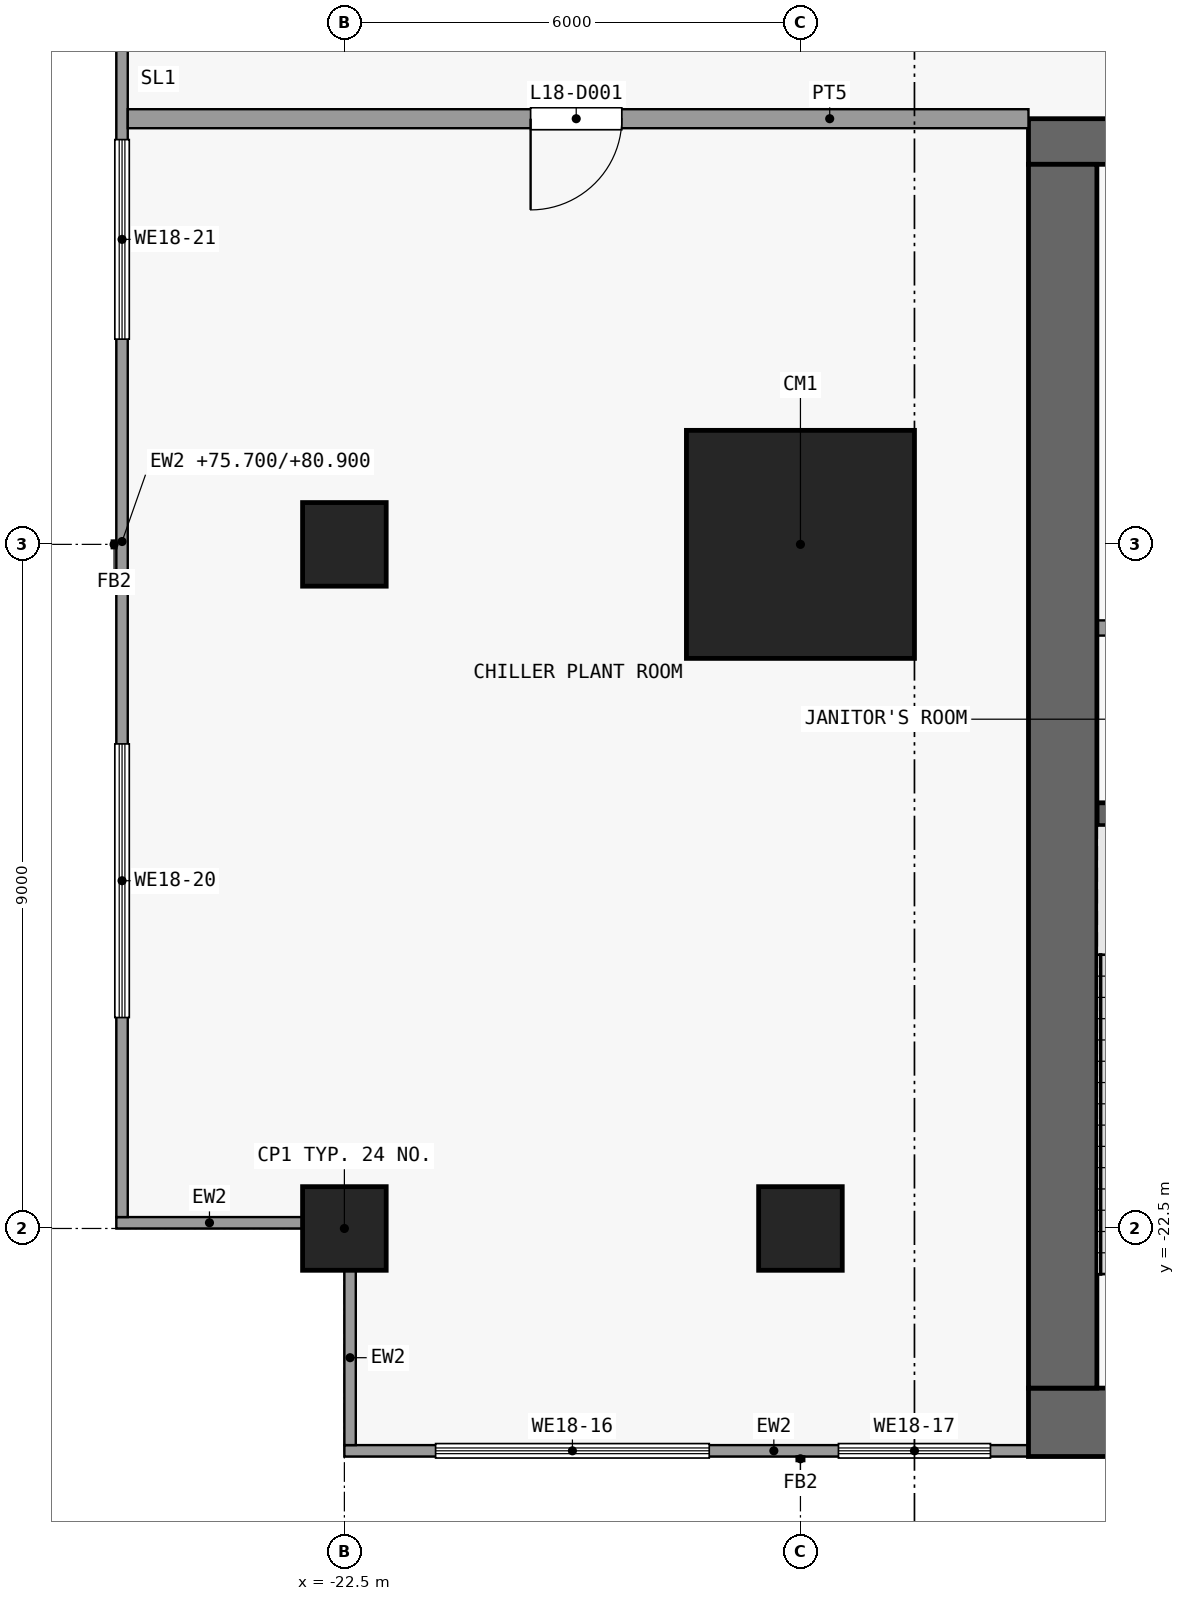
"""IFC4 building model, lengths in metres.
Left out: names, types, materials, properties, quantities, classifications, styles, units other than length and angle.
Written with IfcOpenShell. Run it as: python <this file> out.ifc"""

import sys

from ifc_helpers import new_model, si_unit, direction, frame, frame_2d, origin, origin_2d, place, context, subcontext, project, spatial, rectangle, extrude, element, fill, save


model = new_model("IFC4")
c1 = context("Model", 3, precision=1e-05, world=origin(), true_north=direction((0.0, 1.0)))
c2 = subcontext(c1, "Body", "Model", "MODEL_VIEW")
j1 = project(units=[si_unit("LENGTHUNIT", "METRE"), si_unit("PLANEANGLEUNIT", "RADIAN")], contexts=[c1])
p1 = place(None, origin())
s1 = spatial("IfcSite", under=j1, at=p1, CompositionType="ELEMENT")
p2 = place(p1, origin())
s2 = spatial("IfcBuilding", under=s1, at=p2, CompositionType="ELEMENT")
p3 = place(p2, frame((0.0, 0.0, 75.7)))
s3 = spatial("IfcBuildingStorey", under=s2, at=p3, CompositionType="ELEMENT", Elevation=75.7)
for number, where, z_axis, x_axis in (
    (1, (-22.5, -22.5, 0.0), (0.0, 0.0, 1.0), (1.0, 0.0, 0.0)),
    (2, (-22.5, -13.5, 0.0), (0.0, 0.0, 1.0), (1.0, 0.0, 0.0)),
    (3, (-16.5, -22.5, 0.0), (0.0, 0.0, 1.0), (1.0, 0.0, 0.0)),
):
    element("IfcColumn", number, at=place(p3, frame(where, z_axis=z_axis, x_axis=x_axis)), inside=s3, PredefinedType="COLUMN", context=c2, shape_type="SweptSolid", body=[
        extrude(rectangle(XDim=1.1, YDim=1.1, at=origin_2d()), origin(), (0.0, 0.0, 1.0), 5.4),
    ])
p4 = place(p3, frame((-16.5, -13.5, 0.0), z_axis=(0.0, 0.0, 1.0), x_axis=(1.0, 0.0, 0.0)))
e4 = element("IfcColumn", 4, at=p4, inside=s3, PredefinedType="COLUMN", context=c2, shape_type="SweptSolid", body=[
    extrude(rectangle(XDim=3.0, YDim=3.0, at=origin_2d()), origin(), (0.0, 0.0, 1.0), 5.4),
])
p5 = place(p3, frame((-13.5, -25.05, 0.0), z_axis=(0.0, 0.0, 1.0), x_axis=(1.0, 0.0, 0.0)))
e5 = element("IfcWall", 5, at=p5, inside=s3, PredefinedType="SHEAR", context=c2, shape_type="SweptSolid", body=[
    extrude(rectangle(XDim=27.0, YDim=0.9, at=frame_2d((13.5, 0.0))), origin(), (0.0, 0.0, 1.0), 5.0),
])
p6 = place(p3, frame((-13.5, -8.2, 0.0), z_axis=(0.0, 0.0, 1.0), x_axis=(1.0, 0.0, 0.0)))
e6 = element("IfcWall", 6, at=p6, inside=s3, PredefinedType="SHEAR", context=c2, shape_type="SweptSolid", body=[
    extrude(rectangle(XDim=27.0, YDim=0.6, at=frame_2d((13.5, 0.0))), origin(), (0.0, 0.0, 1.0), 5.0),
])
p7 = place(p6, frame((7.8, 0.0, 0.0)))
e7 = element("IfcOpeningElement", 7, at=p7, cuts=e6, PredefinedType="OPENING", context=c2, shape_type="SweptSolid", body=[
    extrude(rectangle(XDim=1.8, YDim=2.1, at=frame_2d((0.9, 1.05))), frame((0.0, 0.31, 0.0), z_axis=(0.0, -1.0, 0.0), x_axis=(1.0, 0.0, 0.0)), (0.0, 0.0, 1.0), 0.62),
])
p8 = place(p6, frame((17.4, 0.0, 0.0)))
e8 = element("IfcOpeningElement", 8, at=p8, cuts=e6, PredefinedType="OPENING", context=c2, shape_type="SweptSolid", body=[
    extrude(rectangle(XDim=1.8, YDim=2.1, at=frame_2d((0.9, 1.05))), frame((0.0, 0.31, 0.0), z_axis=(0.0, -1.0, 0.0), x_axis=(1.0, 0.0, 0.0)), (0.0, 0.0, 1.0), 0.62),
])
p9 = place(p6, frame((2.725, 0.0, 0.0)))
e9 = element("IfcOpeningElement", 9, at=p9, cuts=e6, PredefinedType="OPENING", context=c2, shape_type="SweptSolid", body=[
    extrude(rectangle(XDim=0.9, YDim=2.1, at=frame_2d((0.45, 1.05))), frame((0.0, 0.31, 0.0), z_axis=(0.0, -1.0, 0.0), x_axis=(1.0, 0.0, 0.0)), (0.0, 0.0, 1.0), 0.62),
])
p10 = place(p6, frame((23.375, 0.0, 0.0)))
e10 = element("IfcOpeningElement", 10, at=p10, cuts=e6, PredefinedType="OPENING", context=c2, shape_type="SweptSolid", body=[
    extrude(rectangle(XDim=0.9, YDim=2.1, at=frame_2d((0.45, 1.05))), frame((0.0, 0.31, 0.0), z_axis=(0.0, -1.0, 0.0), x_axis=(1.0, 0.0, 0.0)), (0.0, 0.0, 1.0), 0.62),
])
p11 = place(p3, frame((-13.05, -24.6, 0.0), z_axis=(0.0, 0.0, 1.0), x_axis=(0.0, 1.0, 0.0)))
e11 = element("IfcWall", 11, at=p11, inside=s3, PredefinedType="SHEAR", context=c2, shape_type="SweptSolid", body=[
    extrude(rectangle(XDim=16.1, YDim=0.9, at=frame_2d((8.05, 0.0))), origin(), (0.0, 0.0, 1.0), 5.0),
])
p12 = place(p3, frame((-12.6, -17.05, 0.0), z_axis=(0.0, 0.0, 1.0), x_axis=(1.0, 0.0, 0.0)))
e12 = element("IfcWall", 12, at=p12, inside=s3, PredefinedType="SHEAR", context=c2, shape_type="SweptSolid", body=[
    extrude(rectangle(XDim=2.85, YDim=0.3, at=frame_2d((1.425, 0.0))), origin(), (0.0, 0.0, 1.0), 5.0),
])
p13 = place(p3, frame((-12.6, -14.6, 0.0), z_axis=(0.0, 0.0, 1.0), x_axis=(1.0, 0.0, 0.0)))
e13 = element("IfcWall", 13, at=p13, inside=s3, PredefinedType="PARTITIONING", context=c2, shape_type="SweptSolid", body=[
    extrude(rectangle(XDim=1.45, YDim=0.2, at=frame_2d((0.725, 0.0))), origin(), (0.0, 0.0, 1.0), 5.0),
])
p14 = place(p3, frame((-13.5, -25.425, 0.0), z_axis=(0.0, 0.0, 1.0), x_axis=(-1.0, 0.0, 0.0)))
e14 = element("IfcWall", 14, at=p14, inside=s3, PredefinedType="SOLIDWALL", context=c2, shape_type="SweptSolid", body=[
    extrude(rectangle(XDim=9.0, YDim=0.15, at=frame_2d((4.5, 0.0))), origin(), (0.0, 0.0, 1.0), 5.0),
])
p15 = place(p14, frame((4.2, 0.0, 1.2)))
e15 = element("IfcOpeningElement", 15, at=p15, cuts=e14, PredefinedType="OPENING", context=c2, shape_type="SweptSolid", body=[
    extrude(rectangle(XDim=3.6, YDim=3.0, at=frame_2d((1.8, 1.5))), frame((0.0, 0.085, 0.0), z_axis=(0.0, -1.0, 0.0), x_axis=(1.0, 0.0, 0.0)), (0.0, 0.0, 1.0), 0.17),
])
p16 = place(p14, frame((0.5, 0.0, 1.2)))
e16 = element("IfcOpeningElement", 16, at=p16, cuts=e14, PredefinedType="OPENING", context=c2, shape_type="SweptSolid", body=[
    extrude(rectangle(XDim=2.0, YDim=3.0, at=frame_2d((1.0, 1.5))), frame((0.0, 0.085, 0.0), z_axis=(0.0, -1.0, 0.0), x_axis=(1.0, 0.0, 0.0)), (0.0, 0.0, 1.0), 0.17),
])
p17 = place(p3, frame((-25.425, -22.35, 0.0), z_axis=(0.0, 0.0, 1.0), x_axis=(0.0, 1.0, 0.0)))
e17 = element("IfcWall", 17, at=p17, inside=s3, PredefinedType="SOLIDWALL", context=c2, shape_type="SweptSolid", body=[
    extrude(rectangle(XDim=47.7, YDim=0.15, at=frame_2d((23.85, 0.0))), origin(), (0.0, 0.0, 1.0), 5.2),
])
p18 = place(p17, frame((2.625, 0.0, 1.2)))
e18 = element("IfcOpeningElement", 18, at=p18, cuts=e17, PredefinedType="OPENING", context=c2, shape_type="SweptSolid", body=[
    extrude(rectangle(XDim=3.6, YDim=3.0, at=frame_2d((1.8, 1.5))), frame((0.0, 0.085, 0.0), z_axis=(0.0, -1.0, 0.0), x_axis=(1.0, 0.0, 0.0)), (0.0, 0.0, 1.0), 0.17),
])
p19 = place(p17, frame((11.55, 0.0, 1.2)))
e19 = element("IfcOpeningElement", 19, at=p19, cuts=e17, PredefinedType="OPENING", context=c2, shape_type="SweptSolid", body=[
    extrude(rectangle(XDim=2.625, YDim=3.0, at=frame_2d((1.312, 1.5))), frame((0.0, 0.085, 0.0), z_axis=(0.0, -1.0, 0.0), x_axis=(1.0, 0.0, 0.0)), (0.0, 0.0, 1.0), 0.17),
])
p20 = place(p17, frame((19.05, 0.0, 1.2)))
e20 = element("IfcOpeningElement", 20, at=p20, cuts=e17, PredefinedType="OPENING", context=c2, shape_type="SweptSolid", body=[
    extrude(rectangle(XDim=3.6, YDim=3.0, at=frame_2d((1.8, 1.5))), frame((0.0, 0.085, 0.0), z_axis=(0.0, -1.0, 0.0), x_axis=(1.0, 0.0, 0.0)), (0.0, 0.0, 1.0), 0.17),
])
p21 = place(p17, frame((25.05, 0.0, 1.2)))
e21 = element("IfcOpeningElement", 21, at=p21, cuts=e17, PredefinedType="OPENING", context=c2, shape_type="SweptSolid", body=[
    extrude(rectangle(XDim=3.6, YDim=3.0, at=frame_2d((1.8, 1.5))), frame((0.0, 0.085, 0.0), z_axis=(0.0, -1.0, 0.0), x_axis=(1.0, 0.0, 0.0)), (0.0, 0.0, 1.0), 0.17),
])
p22 = place(p17, frame((31.05, 0.0, 1.2)))
e22 = element("IfcOpeningElement", 22, at=p22, cuts=e17, PredefinedType="OPENING", context=c2, shape_type="SweptSolid", body=[
    extrude(rectangle(XDim=3.6, YDim=3.0, at=frame_2d((1.8, 1.5))), frame((0.0, 0.085, 0.0), z_axis=(0.0, -1.0, 0.0), x_axis=(1.0, 0.0, 0.0)), (0.0, 0.0, 1.0), 0.17),
])
p23 = place(p17, frame((37.05, 0.0, 1.2)))
e23 = element("IfcOpeningElement", 23, at=p23, cuts=e17, PredefinedType="OPENING", context=c2, shape_type="SweptSolid", body=[
    extrude(rectangle(XDim=1.525, YDim=3.0, at=frame_2d((0.762, 1.5))), frame((0.0, 0.085, 0.0), z_axis=(0.0, -1.0, 0.0), x_axis=(1.0, 0.0, 0.0)), (0.0, 0.0, 1.0), 0.17),
])
p24 = place(p17, frame((39.125, 0.0, 1.2)))
e24 = element("IfcOpeningElement", 24, at=p24, cuts=e17, PredefinedType="OPENING", context=c2, shape_type="SweptSolid", body=[
    extrude(rectangle(XDim=1.525, YDim=3.0, at=frame_2d((0.762, 1.5))), frame((0.0, 0.085, 0.0), z_axis=(0.0, -1.0, 0.0), x_axis=(1.0, 0.0, 0.0)), (0.0, 0.0, 1.0), 0.17),
])
p25 = place(p17, frame((42.975, 0.0, 1.2)))
e25 = element("IfcOpeningElement", 25, at=p25, cuts=e17, PredefinedType="OPENING", context=c2, shape_type="SweptSolid", body=[
    extrude(rectangle(XDim=3.6, YDim=3.0, at=frame_2d((1.8, 1.5))), frame((0.0, 0.085, 0.0), z_axis=(0.0, -1.0, 0.0), x_axis=(1.0, 0.0, 0.0)), (0.0, 0.0, 1.0), 0.17),
])
p26 = place(p3, frame((-22.425, -25.35, 0.0), z_axis=(0.0, 0.0, 1.0), x_axis=(0.0, 1.0, 0.0)))
e26 = element("IfcWall", 26, at=p26, inside=s3, PredefinedType="SOLIDWALL", context=c2, shape_type="SweptSolid", body=[
    extrude(rectangle(XDim=2.3, YDim=0.15, at=frame_2d((1.15, 0.0))), origin(), (0.0, 0.0, 1.0), 5.0),
])
p27 = place(p3, frame((-23.05, -22.425, 0.0), z_axis=(0.0, 0.0, 1.0), x_axis=(-1.0, 0.0, 0.0)))
e27 = element("IfcWall", 27, at=p27, inside=s3, PredefinedType="SOLIDWALL", context=c2, shape_type="SweptSolid", body=[
    extrude(rectangle(XDim=2.45, YDim=0.15, at=frame_2d((1.225, 0.0))), origin(), (0.0, 0.0, 1.0), 5.0),
])
p28 = place(p3, frame((-25.35, -7.9, 0.0), z_axis=(0.0, 0.0, 1.0), x_axis=(1.0, 0.0, 0.0)))
e28 = element("IfcWall", 28, at=p28, inside=s3, PredefinedType="PARTITIONING", context=c2, shape_type="SweptSolid", body=[
    extrude(rectangle(XDim=11.85, YDim=0.25, at=frame_2d((5.925, 0.0))), origin(), (0.0, 0.0, 1.0), 5.0),
])
p29 = place(p28, frame((5.3, 0.0, 0.0)))
e29 = element("IfcOpeningElement", 29, at=p29, cuts=e28, PredefinedType="OPENING", context=c2, shape_type="SweptSolid", body=[
    extrude(rectangle(XDim=1.2, YDim=2.1, at=frame_2d((0.6, 1.05))), frame((0.0, 0.135, 0.0), z_axis=(0.0, -1.0, 0.0), x_axis=(1.0, 0.0, 0.0)), (0.0, 0.0, 1.0), 0.27),
])
p30 = place(p15, origin())
e30 = element("IfcWindow", 30, at=p30, inside=s3, PartitioningType="SINGLE_PANEL", PredefinedType="WINDOW", context=c2, shape_type="SweptSolid", body=[
    extrude(rectangle(XDim=3.6, YDim=3.0, at=frame_2d((1.8, 1.5))), frame((0.0, 0.03, 0.0), z_axis=(0.0, -1.0, 0.0), x_axis=(1.0, 0.0, 0.0)), (0.0, 0.0, 1.0), 0.06),
])
fill(e15, e30)
p31 = place(p16, origin())
e31 = element("IfcWindow", 31, at=p31, inside=s3, PartitioningType="SINGLE_PANEL", PredefinedType="WINDOW", context=c2, shape_type="SweptSolid", body=[
    extrude(rectangle(XDim=2.0, YDim=3.0, at=frame_2d((1.0, 1.5))), frame((0.0, 0.03, 0.0), z_axis=(0.0, -1.0, 0.0), x_axis=(1.0, 0.0, 0.0)), (0.0, 0.0, 1.0), 0.06),
])
fill(e16, e31)
p32 = place(p18, origin())
e32 = element("IfcWindow", 32, at=p32, inside=s3, PartitioningType="SINGLE_PANEL", PredefinedType="WINDOW", context=c2, shape_type="SweptSolid", body=[
    extrude(rectangle(XDim=3.6, YDim=3.0, at=frame_2d((1.8, 1.5))), frame((0.0, 0.03, 0.0), z_axis=(0.0, -1.0, 0.0), x_axis=(1.0, 0.0, 0.0)), (0.0, 0.0, 1.0), 0.06),
])
fill(e18, e32)
p33 = place(p19, origin())
e33 = element("IfcWindow", 33, at=p33, inside=s3, PartitioningType="SINGLE_PANEL", PredefinedType="WINDOW", context=c2, shape_type="SweptSolid", body=[
    extrude(rectangle(XDim=2.625, YDim=3.0, at=frame_2d((1.312, 1.5))), frame((0.0, 0.03, 0.0), z_axis=(0.0, -1.0, 0.0), x_axis=(1.0, 0.0, 0.0)), (0.0, 0.0, 1.0), 0.06),
])
fill(e19, e33)
p34 = place(p29, origin())
e34 = element("IfcDoor", 34, at=p34, inside=s3, OperationType="SINGLE_SWING_LEFT", PredefinedType="DOOR", context=c2, shape_type="SweptSolid", body=[
    extrude(rectangle(XDim=1.2, YDim=2.1, at=frame_2d((0.6, 1.05))), frame((0.0, 0.025, 0.0), z_axis=(0.0, -1.0, 0.0), x_axis=(1.0, 0.0, 0.0)), (0.0, 0.0, 1.0), 0.05),
])
fill(e29, e34)
save(model, sys.argv[1])
